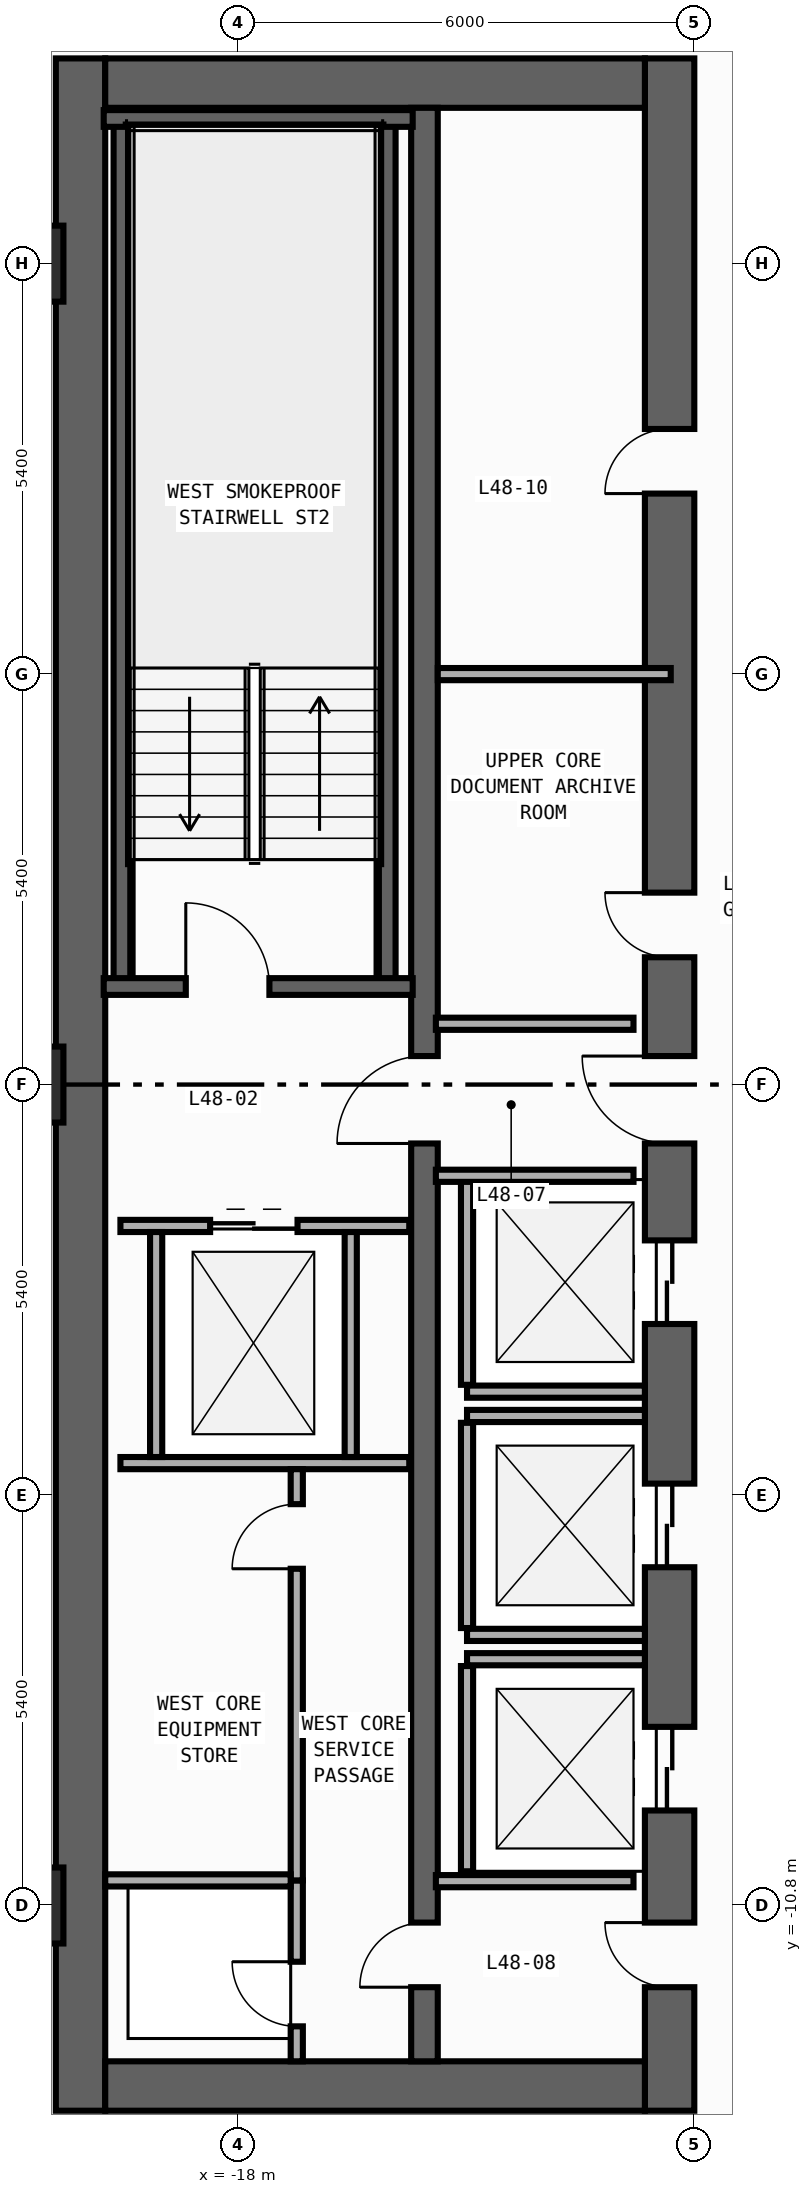
"""IFC4 building model, lengths in metres.
Left out: names, types, materials, properties, quantities, classifications, styles, units other than length and angle.
Written with IfcOpenShell. Run it as: python <this file> out.ifc"""

import sys

from ifc_helpers import new_model, si_unit, direction, frame, frame_2d, origin, origin_2d, place, context, subcontext, project, spatial, rectangle, extrude, element, fill, save


model = new_model("IFC4")
c1 = context("Model", 3, precision=1e-05, world=origin(), true_north=direction((0.0, 1.0)))
c2 = subcontext(c1, "Body", "Model", "MODEL_VIEW")
j1 = project(units=[si_unit("LENGTHUNIT", "METRE"), si_unit("PLANEANGLEUNIT", "RADIAN")], contexts=[c1])
p1 = place(None, origin())
s1 = spatial("IfcSite", under=j1, at=p1, CompositionType="ELEMENT")
p2 = place(p1, origin())
s2 = spatial("IfcBuilding", under=s1, at=p2, CompositionType="ELEMENT")
p3 = place(p2, frame((0.0, 0.0, 206.8)))
s3 = spatial("IfcBuildingStorey", under=s2, at=p3, CompositionType="ELEMENT", Elevation=206.8)
p4 = place(p3, frame((-20.075, -13.5, 0.0), z_axis=(0.0, 0.0, 1.0), x_axis=(0.0, 1.0, 0.0)))
e1 = element("IfcWall", 1, at=p4, inside=s3, PredefinedType="SHEAR", context=c2, shape_type="SweptSolid", body=[
    extrude(rectangle(XDim=27.0, YDim=0.65, at=frame_2d((13.5, 0.0))), origin(), (0.0, 0.0, 1.0), 3.54),
])
p5 = place(p3, frame((-12.325, -13.5, 0.0), z_axis=(0.0, 0.0, 1.0), x_axis=(0.0, 1.0, 0.0)))
e2 = element("IfcWall", 2, at=p5, inside=s3, PredefinedType="SHEAR", context=c2, shape_type="SweptSolid", body=[
    extrude(rectangle(XDim=27.0, YDim=0.65, at=frame_2d((13.5, 0.0))), origin(), (0.0, 0.0, 1.0), 3.54),
])
p6 = place(p5, frame((10.35, 0.0, 0.0)))
e3 = element("IfcOpeningElement", 3, at=p6, cuts=e2, PredefinedType="OPENING", context=c2, shape_type="SweptSolid", body=[
    extrude(rectangle(XDim=1.1, YDim=2.2, at=frame_2d((0.55, 1.1))), frame((0.0, 0.335, 0.0), z_axis=(0.0, -1.0, 0.0), x_axis=(1.0, 0.0, 0.0)), (0.0, 0.0, 1.0), 0.67),
])
p7 = place(p5, frame((7.15, 0.0, 0.0)))
e4 = element("IfcOpeningElement", 4, at=p7, cuts=e2, PredefinedType="OPENING", context=c2, shape_type="SweptSolid", body=[
    extrude(rectangle(XDim=1.1, YDim=2.2, at=frame_2d((0.55, 1.1))), frame((0.0, 0.335, 0.0), z_axis=(0.0, -1.0, 0.0), x_axis=(1.0, 0.0, 0.0)), (0.0, 0.0, 1.0), 0.67),
])
p8 = place(p5, frame((3.95, 0.0, 0.0)))
e5 = element("IfcOpeningElement", 5, at=p8, cuts=e2, PredefinedType="OPENING", context=c2, shape_type="SweptSolid", body=[
    extrude(rectangle(XDim=1.1, YDim=2.2, at=frame_2d((0.55, 1.1))), frame((0.0, 0.335, 0.0), z_axis=(0.0, -1.0, 0.0), x_axis=(1.0, 0.0, 0.0)), (0.0, 0.0, 1.0), 0.67),
])
p9 = place(p5, frame((15.175, 0.0, 0.0)))
e6 = element("IfcOpeningElement", 6, at=p9, cuts=e2, PredefinedType="OPENING", context=c2, shape_type="SweptSolid", body=[
    extrude(rectangle(XDim=0.85, YDim=2.1, at=frame_2d((0.425, 1.05))), frame((0.0, 0.335, 0.0), z_axis=(0.0, -1.0, 0.0), x_axis=(1.0, 0.0, 0.0)), (0.0, 0.0, 1.0), 0.67),
])
p10 = place(p5, frame((21.275, 0.0, 0.0)))
e7 = element("IfcOpeningElement", 7, at=p10, cuts=e2, PredefinedType="OPENING", context=c2, shape_type="SweptSolid", body=[
    extrude(rectangle(XDim=0.85, YDim=2.1, at=frame_2d((0.425, 1.05))), frame((0.0, 0.335, 0.0), z_axis=(0.0, -1.0, 0.0), x_axis=(1.0, 0.0, 0.0)), (0.0, 0.0, 1.0), 0.67),
])
p11 = place(p5, frame((12.725, 0.0, 0.0)))
e8 = element("IfcOpeningElement", 8, at=p11, cuts=e2, PredefinedType="OPENING", context=c2, shape_type="SweptSolid", body=[
    extrude(rectangle(XDim=1.15, YDim=2.2, at=frame_2d((0.575, 1.1))), frame((0.0, 0.335, 0.0), z_axis=(0.0, -1.0, 0.0), x_axis=(1.0, 0.0, 0.0)), (0.0, 0.0, 1.0), 0.67),
])
p12 = place(p5, frame((1.625, 0.0, 0.0)))
e9 = element("IfcOpeningElement", 9, at=p12, cuts=e2, PredefinedType="OPENING", context=c2, shape_type="SweptSolid", body=[
    extrude(rectangle(XDim=0.85, YDim=2.1, at=frame_2d((0.425, 1.05))), frame((0.0, 0.335, 0.0), z_axis=(0.0, -1.0, 0.0), x_axis=(1.0, 0.0, 0.0)), (0.0, 0.0, 1.0), 0.67),
])
for number, where, z_axis, x_axis in (
    (10, (-19.75, -13.175, 0.0), (0.0, 0.0, 1.0), (1.0, 0.0, 0.0)),
    (11, (-19.75, 13.175, 0.0), (0.0, 0.0, 1.0), (1.0, 0.0, 0.0)),
):
    element("IfcWall", number, at=place(p3, frame(where, z_axis=z_axis, x_axis=x_axis)), inside=s3, PredefinedType="SHEAR", context=c2, shape_type="SweptSolid", body=[
        extrude(rectangle(XDim=7.1, YDim=0.65, at=frame_2d((3.55, 0.0))), origin(), (0.0, 0.0, 1.0), 3.54),
    ])
p13 = place(p3, frame((-15.55, -12.85, 0.0), z_axis=(0.0, 0.0, 1.0), x_axis=(0.0, 1.0, 0.0)))
e12 = element("IfcWall", 12, at=p13, inside=s3, PredefinedType="SHEAR", context=c2, shape_type="SweptSolid", body=[
    extrude(rectangle(XDim=25.7, YDim=0.35, at=frame_2d((12.85, 0.0))), origin(), (0.0, 0.0, 1.0), 3.54),
])
p14 = place(p13, frame((12.075, 0.0, 0.0)))
e13 = element("IfcOpeningElement", 13, at=p14, cuts=e12, PredefinedType="OPENING", context=c2, shape_type="SweptSolid", body=[
    extrude(rectangle(XDim=1.15, YDim=2.2, at=frame_2d((0.575, 1.1))), frame((0.0, 0.185, 0.0), z_axis=(0.0, -1.0, 0.0), x_axis=(1.0, 0.0, 0.0)), (0.0, 0.0, 1.0), 0.37),
])
p15 = place(p13, frame((0.975, 0.0, 0.0)))
e14 = element("IfcOpeningElement", 14, at=p15, cuts=e12, PredefinedType="OPENING", context=c2, shape_type="SweptSolid", body=[
    extrude(rectangle(XDim=0.85, YDim=2.1, at=frame_2d((0.425, 1.05))), frame((0.0, 0.185, 0.0), z_axis=(0.0, -1.0, 0.0), x_axis=(1.0, 0.0, 0.0)), (0.0, 0.0, 1.0), 0.37),
])
for number, where, z_axis, x_axis in (
    (15, (-16.04, 1.29, 0.0), (0.0, 0.0, 1.0), (0.0, 1.0, 0.0)),
    (16, (-19.53, 1.29, 0.0), (0.0, 0.0, 1.0), (0.0, 1.0, 0.0)),
):
    element("IfcWall", number, at=place(p3, frame(where, z_axis=z_axis, x_axis=x_axis)), inside=s3, PredefinedType="SHEAR", context=c2, shape_type="SweptSolid", body=[
        extrude(rectangle(XDim=11.42, YDim=0.22, at=frame_2d((5.71, 0.0))), origin(), (0.0, 0.0, 1.0), 3.54),
    ])
p16 = place(p3, frame((-19.77, 12.71, 0.0), z_axis=(0.0, 0.0, 1.0), x_axis=(1.0, 0.0, 0.0)))
e17 = element("IfcWall", 17, at=p16, inside=s3, PredefinedType="SHEAR", context=c2, shape_type="SweptSolid", body=[
    extrude(rectangle(XDim=4.065, YDim=0.22, at=frame_2d((2.032, 0.0))), origin(), (0.0, 0.0, 1.0), 3.54),
])
p17 = place(p3, frame((-19.77, 1.29, 0.0), z_axis=(0.0, 0.0, 1.0), x_axis=(1.0, 0.0, 0.0)))
e18 = element("IfcWall", 18, at=p17, inside=s3, PredefinedType="SHEAR", context=c2, shape_type="SweptSolid", body=[
    extrude(rectangle(XDim=4.065, YDim=0.22, at=frame_2d((2.032, 0.0))), origin(), (0.0, 0.0, 1.0), 3.54),
])
p18 = place(p17, frame((1.08, 0.0, 0.0)))
e19 = element("IfcOpeningElement", 19, at=p18, cuts=e18, PredefinedType="OPENING", context=c2, shape_type="SweptSolid", body=[
    extrude(rectangle(XDim=1.1, YDim=2.2, at=frame_2d((0.55, 1.1))), frame((0.0, 0.12, 0.0), z_axis=(0.0, -1.0, 0.0), x_axis=(1.0, 0.0, 0.0)), (0.0, 0.0, 1.0), 0.24),
])
for number, where, z_axis, x_axis in (
    (20, (-20.8, -10.8, 0.0), (0.0, 0.0, 1.0), (1.0, 0.0, 0.0)),
    (21, (-20.8, 0.0, 0.0), (0.0, 0.0, 1.0), (1.0, 0.0, 0.0)),
    (22, (-20.8, 10.8, 0.0), (0.0, 0.0, 1.0), (1.0, 0.0, 0.0)),
):
    element("IfcColumn", number, at=place(p3, frame(where, z_axis=z_axis, x_axis=x_axis)), inside=s3, PredefinedType="COLUMN", context=c2, shape_type="SweptSolid", body=[
        extrude(rectangle(XDim=1.0, YDim=1.0, at=origin_2d()), origin(), (0.0, 0.0, 1.0), 3.8),
    ])
p19 = place(p3, frame((-14.99, -4.04, 0.0), z_axis=(0.0, 0.0, 1.0), x_axis=(1.0, 0.0, 0.0)))
e23 = element("IfcWall", 23, at=p19, inside=s3, PredefinedType="STANDARD", context=c2, shape_type="SweptSolid", body=[
    extrude(rectangle(XDim=2.34, YDim=0.16, at=frame_2d((1.17, 0.0))), origin(), (0.0, 0.0, 1.0), 3.54),
])
p20 = place(p3, frame((-14.99, -3.95, 0.0), z_axis=(0.0, 0.0, 1.0), x_axis=(0.0, 1.0, 0.0)))
e24 = element("IfcWall", 24, at=p20, inside=s3, PredefinedType="STANDARD", context=c2, shape_type="SweptSolid", body=[
    extrude(rectangle(XDim=2.7, YDim=0.16, at=frame_2d((1.35, 0.0))), origin(), (0.0, 0.0, 1.0), 3.54),
])
for number, where, z_axis, x_axis in (
    (25, (-14.99, -7.24, 0.0), (0.0, 0.0, 1.0), (1.0, 0.0, 0.0)),
    (26, (-14.99, -4.36, 0.0), (0.0, 0.0, 1.0), (1.0, 0.0, 0.0)),
):
    element("IfcWall", number, at=place(p3, frame(where, z_axis=z_axis, x_axis=x_axis)), inside=s3, PredefinedType="STANDARD", context=c2, shape_type="SweptSolid", body=[
        extrude(rectangle(XDim=2.34, YDim=0.16, at=frame_2d((1.17, 0.0))), origin(), (0.0, 0.0, 1.0), 3.54),
    ])
p21 = place(p3, frame((-14.99, -7.15, 0.0), z_axis=(0.0, 0.0, 1.0), x_axis=(0.0, 1.0, 0.0)))
e27 = element("IfcWall", 27, at=p21, inside=s3, PredefinedType="STANDARD", context=c2, shape_type="SweptSolid", body=[
    extrude(rectangle(XDim=2.7, YDim=0.16, at=frame_2d((1.35, 0.0))), origin(), (0.0, 0.0, 1.0), 3.54),
])
p22 = place(p3, frame((-14.99, -7.56, 0.0), z_axis=(0.0, 0.0, 1.0), x_axis=(1.0, 0.0, 0.0)))
e28 = element("IfcWall", 28, at=p22, inside=s3, PredefinedType="STANDARD", context=c2, shape_type="SweptSolid", body=[
    extrude(rectangle(XDim=2.34, YDim=0.16, at=frame_2d((1.17, 0.0))), origin(), (0.0, 0.0, 1.0), 3.54),
])
p23 = place(p3, frame((-14.99, -10.35, 0.0), z_axis=(0.0, 0.0, 1.0), x_axis=(0.0, 1.0, 0.0)))
e29 = element("IfcWall", 29, at=p23, inside=s3, PredefinedType="STANDARD", context=c2, shape_type="SweptSolid", body=[
    extrude(rectangle(XDim=2.7, YDim=0.16, at=frame_2d((1.35, 0.0))), origin(), (0.0, 0.0, 1.0), 3.54),
])
p24 = place(p3, frame((-19.55, -1.86, 0.0), z_axis=(0.0, 0.0, 1.0), x_axis=(1.0, 0.0, 0.0)))
e30 = element("IfcWall", 30, at=p24, inside=s3, PredefinedType="STANDARD", context=c2, shape_type="SweptSolid", body=[
    extrude(rectangle(XDim=3.8, YDim=0.16, at=frame_2d((1.9, 0.0))), origin(), (0.0, 0.0, 1.0), 3.54),
])
p25 = place(p24, frame((1.18, 0.0, 0.0)))
e31 = element("IfcOpeningElement", 31, at=p25, cuts=e30, PredefinedType="OPENING", context=c2, shape_type="SweptSolid", body=[
    extrude(rectangle(XDim=1.15, YDim=2.2, at=frame_2d((0.575, 1.1))), frame((0.0, 0.09, 0.0), z_axis=(0.0, -1.0, 0.0), x_axis=(1.0, 0.0, 0.0)), (0.0, 0.0, 1.0), 0.18),
])
p26 = place(p3, frame((-19.55, -4.98, 0.0), z_axis=(0.0, 0.0, 1.0), x_axis=(1.0, 0.0, 0.0)))
e32 = element("IfcWall", 32, at=p26, inside=s3, PredefinedType="STANDARD", context=c2, shape_type="SweptSolid", body=[
    extrude(rectangle(XDim=3.8, YDim=0.16, at=frame_2d((1.9, 0.0))), origin(), (0.0, 0.0, 1.0), 3.54),
])
for number, where, z_axis, x_axis in (
    (33, (-19.08, -4.9, 0.0), (0.0, 0.0, 1.0), (0.0, 1.0, 0.0)),
    (34, (-16.52, -4.9, 0.0), (0.0, 0.0, 1.0), (0.0, 1.0, 0.0)),
):
    element("IfcWall", number, at=place(p3, frame(where, z_axis=z_axis, x_axis=x_axis)), inside=s3, PredefinedType="STANDARD", context=c2, shape_type="SweptSolid", body=[
        extrude(rectangle(XDim=2.96, YDim=0.16, at=frame_2d((1.48, 0.0))), origin(), (0.0, 0.0, 1.0), 3.54),
    ])
for number, where, z_axis, x_axis in (
    (35, (-15.4, 0.8, 0.0), (0.0, 0.0, 1.0), (1.0, 0.0, 0.0)),
    (36, (-15.4, -1.2, 0.0), (0.0, 0.0, 1.0), (1.0, 0.0, 0.0)),
    (37, (-15.4, -10.48, 0.0), (0.0, 0.0, 1.0), (1.0, 0.0, 0.0)),
):
    element("IfcWall", number, at=place(p3, frame(where, z_axis=z_axis, x_axis=x_axis)), inside=s3, PredefinedType="STANDARD", context=c2, shape_type="SweptSolid", body=[
        extrude(rectangle(XDim=2.6, YDim=0.16, at=frame_2d((1.3, 0.0))), origin(), (0.0, 0.0, 1.0), 3.54),
    ])
p27 = place(p3, frame((-17.23, -12.85, 0.0), z_axis=(0.0, 0.0, 1.0), x_axis=(0.0, 1.0, 0.0)))
e38 = element("IfcWall", 38, at=p27, inside=s3, PredefinedType="PARTITIONING", context=c2, shape_type="SweptSolid", body=[
    extrude(rectangle(XDim=2.38, YDim=0.16, at=frame_2d((1.19, 0.0))), origin(), (0.0, 0.0, 1.0), 3.54),
])
p28 = place(p27, frame((0.46, 0.0, 0.0)))
e39 = element("IfcOpeningElement", 39, at=p28, cuts=e38, PredefinedType="OPENING", context=c2, shape_type="SweptSolid", body=[
    extrude(rectangle(XDim=0.85, YDim=2.1, at=frame_2d((0.425, 1.05))), frame((0.0, 0.09, 0.0), z_axis=(0.0, -1.0, 0.0), x_axis=(1.0, 0.0, 0.0)), (0.0, 0.0, 1.0), 0.18),
])
p29 = place(p3, frame((-17.23, -10.47, 0.0), z_axis=(0.0, 0.0, 1.0), x_axis=(0.0, 1.0, 0.0)))
e40 = element("IfcWall", 40, at=p29, inside=s3, PredefinedType="PARTITIONING", context=c2, shape_type="SweptSolid", body=[
    extrude(rectangle(XDim=5.41, YDim=0.16, at=frame_2d((2.705, 0.0))), origin(), (0.0, 0.0, 1.0), 3.54),
])
p30 = place(p29, frame((4.1, 0.0, 0.0)))
e41 = element("IfcOpeningElement", 41, at=p30, cuts=e40, PredefinedType="OPENING", context=c2, shape_type="SweptSolid", body=[
    extrude(rectangle(XDim=0.85, YDim=2.1, at=frame_2d((0.425, 1.05))), frame((0.0, 0.09, 0.0), z_axis=(0.0, -1.0, 0.0), x_axis=(1.0, 0.0, 0.0)), (0.0, 0.0, 1.0), 0.18),
])
p31 = place(p3, frame((-19.75, -10.47, 0.0), z_axis=(0.0, 0.0, 1.0), x_axis=(1.0, 0.0, 0.0)))
e42 = element("IfcWall", 42, at=p31, inside=s3, PredefinedType="PARTITIONING", context=c2, shape_type="SweptSolid", body=[
    extrude(rectangle(XDim=2.44, YDim=0.16, at=frame_2d((1.22, 0.0))), origin(), (0.0, 0.0, 1.0), 3.54),
])
p32 = place(p3, frame((-15.375, 5.4, 0.0), z_axis=(0.0, 0.0, 1.0), x_axis=(1.0, 0.0, 0.0)))
e43 = element("IfcWall", 43, at=p32, inside=s3, PredefinedType="PARTITIONING", context=c2, shape_type="SweptSolid", body=[
    extrude(rectangle(XDim=3.065, YDim=0.16, at=frame_2d((1.532, 0.0))), origin(), (0.0, 0.0, 1.0), 3.54),
])
p33 = place(p18, origin())
e44 = element("IfcDoor", 44, at=p33, inside=s3, OperationType="SINGLE_SWING_LEFT", PredefinedType="DOOR", context=c2, shape_type="SweptSolid", body=[
    extrude(rectangle(XDim=1.1, YDim=2.2, at=frame_2d((0.55, 1.1))), frame((0.0, 0.025, 0.0), z_axis=(0.0, -1.0, 0.0), x_axis=(1.0, 0.0, 0.0)), (0.0, 0.0, 1.0), 0.05),
])
fill(e19, e44)
p34 = place(p6, origin())
e45 = element("IfcDoor", 45, at=p34, inside=s3, OperationType="DOUBLE_DOOR_SLIDING", PredefinedType="DOOR", context=c2, shape_type="SweptSolid", body=[
    extrude(rectangle(XDim=1.1, YDim=2.2, at=frame_2d((0.55, 1.1))), frame((0.0, 0.025, 0.0), z_axis=(0.0, -1.0, 0.0), x_axis=(1.0, 0.0, 0.0)), (0.0, 0.0, 1.0), 0.05),
])
fill(e3, e45)
p35 = place(p7, origin())
e46 = element("IfcDoor", 46, at=p35, inside=s3, OperationType="DOUBLE_DOOR_SLIDING", PredefinedType="DOOR", context=c2, shape_type="SweptSolid", body=[
    extrude(rectangle(XDim=1.1, YDim=2.2, at=frame_2d((0.55, 1.1))), frame((0.0, 0.025, 0.0), z_axis=(0.0, -1.0, 0.0), x_axis=(1.0, 0.0, 0.0)), (0.0, 0.0, 1.0), 0.05),
])
fill(e4, e46)
p36 = place(p8, origin())
e47 = element("IfcDoor", 47, at=p36, inside=s3, OperationType="DOUBLE_DOOR_SLIDING", PredefinedType="DOOR", context=c2, shape_type="SweptSolid", body=[
    extrude(rectangle(XDim=1.1, YDim=2.2, at=frame_2d((0.55, 1.1))), frame((0.0, 0.025, 0.0), z_axis=(0.0, -1.0, 0.0), x_axis=(1.0, 0.0, 0.0)), (0.0, 0.0, 1.0), 0.05),
])
fill(e5, e47)
p37 = place(p9, origin())
e48 = element("IfcDoor", 48, at=p37, inside=s3, OperationType="SINGLE_SWING_RIGHT", PredefinedType="DOOR", context=c2, shape_type="SweptSolid", body=[
    extrude(rectangle(XDim=0.85, YDim=2.1, at=frame_2d((0.425, 1.05))), frame((0.0, 0.025, 0.0), z_axis=(0.0, -1.0, 0.0), x_axis=(1.0, 0.0, 0.0)), (0.0, 0.0, 1.0), 0.05),
])
fill(e6, e48)
p38 = place(p10, origin())
e49 = element("IfcDoor", 49, at=p38, inside=s3, OperationType="SINGLE_SWING_LEFT", PredefinedType="DOOR", context=c2, shape_type="SweptSolid", body=[
    extrude(rectangle(XDim=0.85, YDim=2.1, at=frame_2d((0.425, 1.05))), frame((0.0, 0.025, 0.0), z_axis=(0.0, -1.0, 0.0), x_axis=(1.0, 0.0, 0.0)), (0.0, 0.0, 1.0), 0.05),
])
fill(e7, e49)
p39 = place(p11, origin())
e50 = element("IfcDoor", 50, at=p39, inside=s3, OperationType="SINGLE_SWING_RIGHT", PredefinedType="DOOR", context=c2, shape_type="SweptSolid", body=[
    extrude(rectangle(XDim=1.15, YDim=2.2, at=frame_2d((0.575, 1.1))), frame((0.0, 0.025, 0.0), z_axis=(0.0, -1.0, 0.0), x_axis=(1.0, 0.0, 0.0)), (0.0, 0.0, 1.0), 0.05),
])
fill(e8, e50)
p40 = place(p14, origin())
e51 = element("IfcDoor", 51, at=p40, inside=s3, OperationType="SINGLE_SWING_LEFT", PredefinedType="DOOR", context=c2, shape_type="SweptSolid", body=[
    extrude(rectangle(XDim=1.15, YDim=2.2, at=frame_2d((0.575, 1.1))), frame((0.0, 0.025, 0.0), z_axis=(0.0, -1.0, 0.0), x_axis=(1.0, 0.0, 0.0)), (0.0, 0.0, 1.0), 0.05),
])
fill(e13, e51)
p41 = place(p12, origin())
e52 = element("IfcDoor", 52, at=p41, inside=s3, OperationType="SINGLE_SWING_RIGHT", PredefinedType="DOOR", context=c2, shape_type="SweptSolid", body=[
    extrude(rectangle(XDim=0.85, YDim=2.1, at=frame_2d((0.425, 1.05))), frame((0.0, 0.025, 0.0), z_axis=(0.0, -1.0, 0.0), x_axis=(1.0, 0.0, 0.0)), (0.0, 0.0, 1.0), 0.05),
])
fill(e9, e52)
p42 = place(p15, origin())
e53 = element("IfcDoor", 53, at=p42, inside=s3, OperationType="SINGLE_SWING_LEFT", PredefinedType="DOOR", context=c2, shape_type="SweptSolid", body=[
    extrude(rectangle(XDim=0.85, YDim=2.1, at=frame_2d((0.425, 1.05))), frame((0.0, 0.025, 0.0), z_axis=(0.0, -1.0, 0.0), x_axis=(1.0, 0.0, 0.0)), (0.0, 0.0, 1.0), 0.05),
])
fill(e14, e53)
p43 = place(p25, origin())
e54 = element("IfcDoor", 54, at=p43, inside=s3, OperationType="DOUBLE_DOOR_SLIDING", PredefinedType="DOOR", context=c2, shape_type="SweptSolid", body=[
    extrude(rectangle(XDim=1.15, YDim=2.2, at=frame_2d((0.575, 1.1))), frame((0.0, 0.025, 0.0), z_axis=(0.0, -1.0, 0.0), x_axis=(1.0, 0.0, 0.0)), (0.0, 0.0, 1.0), 0.05),
])
fill(e31, e54)
p44 = place(p28, origin())
e55 = element("IfcDoor", 55, at=p44, inside=s3, OperationType="SINGLE_SWING_RIGHT", PredefinedType="DOOR", context=c2, shape_type="SweptSolid", body=[
    extrude(rectangle(XDim=0.85, YDim=2.1, at=frame_2d((0.425, 1.05))), frame((0.0, 0.025, 0.0), z_axis=(0.0, -1.0, 0.0), x_axis=(1.0, 0.0, 0.0)), (0.0, 0.0, 1.0), 0.05),
])
fill(e39, e55)
p45 = place(p30, origin())
e56 = element("IfcDoor", 56, at=p45, inside=s3, OperationType="SINGLE_SWING_LEFT", PredefinedType="DOOR", context=c2, shape_type="SweptSolid", body=[
    extrude(rectangle(XDim=0.85, YDim=2.1, at=frame_2d((0.425, 1.05))), frame((0.0, 0.025, 0.0), z_axis=(0.0, -1.0, 0.0), x_axis=(1.0, 0.0, 0.0)), (0.0, 0.0, 1.0), 0.05),
])
fill(e41, e56)
save(model, sys.argv[1])
